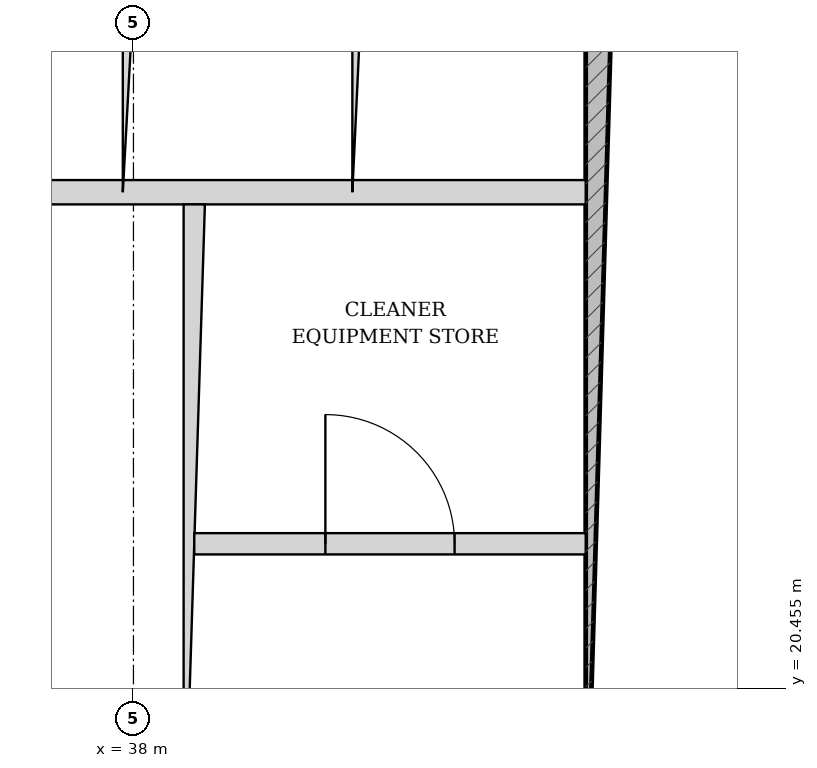
"""IFC4 building model, lengths in metres.
Left out: names, types, materials, properties, quantities, classifications, styles, units other than length and angle.
Written with IfcOpenShell. Run it as: python <this file> out.ifc"""

import sys

from ifc_helpers import new_model, si_unit, direction, frame, frame_2d, origin, place, context, subcontext, project, spatial, rectangle, extrude, source, transform, mapped, element, fill, save


model = new_model("IFC4")
c1 = context("Model", 3, precision=1e-05, world=origin(), true_north=direction((-0.2419218956, 0.970295726276)))
c2 = subcontext(c1, "Body", "Model", "MODEL_VIEW")
j1 = project(units=[si_unit("LENGTHUNIT", "METRE"), si_unit("PLANEANGLEUNIT", "RADIAN")], contexts=[c1])
p1 = place(None, origin())
s1 = spatial("IfcSite", under=j1, at=p1, CompositionType="ELEMENT")
p2 = place(p1, origin())
s2 = spatial("IfcBuilding", under=s1, at=p2, CompositionType="ELEMENT")
p3 = place(p2, frame((0.0, 0.0, 45.6)))
s3 = spatial("IfcBuildingStorey", under=s2, at=p3, CompositionType="ELEMENT", Elevation=45.6)
p4 = place(p3, frame((41.2, 19.175, 0.0), z_axis=(0.0, 0.0, 1.0), x_axis=(0.0, 1.0, 0.0)))
e1 = element("IfcWall", 1, at=p4, inside=s3, PredefinedType="SHEAR", context=c2, shape_type="SweptSolid", body=[
    extrude(rectangle(XDim=15.25, YDim=0.45, at=frame_2d((7.625, 0.0))), origin(), (0.0, 0.0, 1.0), 3.32),
])
p5 = place(p4, frame((7.8, 0.0, 0.0)))
e2 = element("IfcOpeningElement", 2, at=p5, cuts=e1, PredefinedType="OPENING", context=c2, shape_type="SweptSolid", body=[
    extrude(rectangle(XDim=1.05, YDim=2.15, at=frame_2d((0.525, 1.075))), frame((0.0, 0.235, 0.0), z_axis=(0.0, -1.0, 0.0), x_axis=(1.0, 0.0, 0.0)), (0.0, 0.0, 1.0), 0.47),
])
p6 = place(p3, frame((35.025, 23.72, 0.0), z_axis=(0.0, 0.0, 1.0), x_axis=(1.0, 0.0, 0.0)))
e3 = element("IfcWall", 3, at=p6, inside=s3, PredefinedType="PARTITIONING", context=c2, shape_type="SweptSolid", body=[
    extrude(rectangle(XDim=5.95, YDim=0.16, at=frame_2d((2.975, 0.0))), origin(), (0.0, 0.0, 1.0), 3.32),
])
p7 = place(p3, frame((38.0, 23.72, 0.0), z_axis=(0.0, 0.0, 1.0), x_axis=(0.0, 1.0, 0.0)))
e4 = element("IfcWall", 4, at=p7, inside=s3, PredefinedType="PARTITIONING", context=c2, shape_type="SweptSolid", body=[
    extrude(rectangle(XDim=2.56, YDim=0.14, at=frame_2d((1.28, 0.0))), origin(), (0.0, 0.0, 1.0), 3.32),
])
p8 = place(p3, frame((39.5, 23.72, 0.0), z_axis=(0.0, 0.0, 1.0), x_axis=(0.0, 1.0, 0.0)))
e5 = element("IfcWall", 5, at=p8, inside=s3, PredefinedType="PARTITIONING", context=c2, shape_type="SweptSolid", body=[
    extrude(rectangle(XDim=2.56, YDim=0.12, at=frame_2d((1.28, 0.0))), origin(), (0.0, 0.0, 1.0), 3.32),
])
p9 = place(p3, frame((38.4, 19.175, 0.0), z_axis=(0.0, 0.0, 1.0), x_axis=(0.0, 1.0, 0.0)))
e6 = element("IfcWall", 6, at=p9, inside=s3, PredefinedType="PARTITIONING", context=c2, shape_type="SweptSolid", body=[
    extrude(rectangle(XDim=4.465, YDim=0.14, at=frame_2d((2.232, 0.0))), origin(), (0.0, 0.0, 1.0), 3.32),
])
p10 = place(p3, frame((38.4, 21.407, 0.0), z_axis=(0.0, 0.0, 1.0), x_axis=(1.0, 0.0, 0.0)))
e7 = element("IfcWall", 7, at=p10, inside=s3, PredefinedType="PARTITIONING", context=c2, shape_type="SweptSolid", body=[
    extrude(rectangle(XDim=2.575, YDim=0.14, at=frame_2d((1.288, 0.0))), origin(), (0.0, 0.0, 1.0), 3.32),
])
p11 = place(p10, frame((0.863, 0.0, 0.0)))
e8 = element("IfcOpeningElement", 8, at=p11, cuts=e7, PredefinedType="OPENING", context=c2, shape_type="SweptSolid", body=[
    extrude(rectangle(XDim=0.85, YDim=2.1, at=frame_2d((0.425, 1.05))), frame((0.0, 0.08, 0.0), z_axis=(0.0, -1.0, 0.0), x_axis=(1.0, 0.0, 0.0)), (0.0, 0.0, 1.0), 0.16),
])
m1 = source(origin(), c2, "Body", "SweptSolid", [
    extrude(rectangle(XDim=0.85, YDim=2.1, at=frame_2d((0.425, 1.05))), frame((0.0, 0.025, 0.0), z_axis=(0.0, -1.0, 0.0), x_axis=(1.0, 0.0, 0.0)), (0.0, 0.0, 1.0), 0.05),
])
p12 = place(p11, origin())
e9 = element("IfcDoor", 9, at=p12, inside=s3, OperationType="SINGLE_SWING_LEFT", PredefinedType="DOOR", context=c2, shape_type="MappedRepresentation", body=[
    mapped(m1, transform((0.0, 0.0, 0.0), scale=1.0)),
])
fill(e8, e9)
save(model, sys.argv[1])
